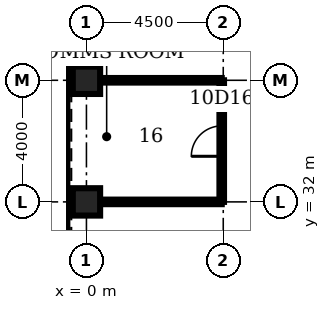
"""IFC4 building model, lengths in metres.
Left out: names, types, materials, properties, quantities, classifications, styles, units other than length and angle.
Written with IfcOpenShell. Run it as: python <this file> out.ifc"""

import sys

from ifc_helpers import new_model, si_unit, direction, frame, frame_2d, origin, origin_2d, place, context, subcontext, project, spatial, rectangle, hollow_rectangle, extrude, element, fill, save


model = new_model("IFC4")
c1 = context("Model", 3, precision=1e-05, world=origin(), true_north=direction((0.0, 1.0)))
c2 = subcontext(c1, "Body", "Model", "MODEL_VIEW")
j1 = project(units=[si_unit("LENGTHUNIT", "METRE"), si_unit("PLANEANGLEUNIT", "RADIAN")], contexts=[c1])
p1 = place(None, origin())
s1 = spatial("IfcSite", under=j1, at=p1, CompositionType="ELEMENT")
p2 = place(p1, origin())
s2 = spatial("IfcBuilding", under=s1, at=p2, CompositionType="ELEMENT")
p3 = place(p2, frame((0.0, 0.0, 50.0)))
s3 = spatial("IfcBuildingStorey", under=s2, at=p3, CompositionType="ELEMENT", Elevation=50.0)
for number, where, z_axis, x_axis in (
    (1, (0.0, 36.0, 0.0), (0.0, 0.0, 1.0), (1.0, 0.0, 0.0)),
    (2, (0.0, 32.0, 0.0), (0.0, 0.0, 1.0), (1.0, 0.0, 0.0)),
):
    element("IfcColumn", number, at=place(p3, frame(where, z_axis=z_axis, x_axis=x_axis)), inside=s3, PredefinedType="COLUMN", context=c2, shape_type="SweptSolid", body=[
        extrude(hollow_rectangle(XDim=0.9, YDim=0.9, WallThickness=0.12, at=origin_2d()), origin(), (0.0, 0.0, 1.0), 4.5),
    ])
for number, where, z_axis, x_axis in (
    (3, (0.45, 32.0, 0.0), (0.0, 0.0, 1.0), (1.0, 0.0, 0.0)),
    (4, (0.45, 36.0, 0.0), (0.0, 0.0, 1.0), (1.0, 0.0, 0.0)),
):
    element("IfcWall", number, at=place(p3, frame(where, z_axis=z_axis, x_axis=x_axis)), inside=s3, PredefinedType="PARTITIONING", context=c2, shape_type="SweptSolid", body=[
        extrude(rectangle(XDim=4.0, YDim=0.15, at=frame_2d((2.0, 0.0))), origin(), (0.0, 0.0, 1.0), 3.0),
    ])
p4 = place(p3, frame((4.45, 32.0, 0.0), z_axis=(0.0, 0.0, 1.0), x_axis=(0.0, 1.0, 0.0)))
e5 = element("IfcWall", 5, at=p4, inside=s3, PredefinedType="PARTITIONING", context=c2, shape_type="SweptSolid", body=[
    extrude(rectangle(XDim=4.0, YDim=0.15, at=frame_2d((2.0, 0.0))), origin(), (0.0, 0.0, 1.0), 3.0),
])
p5 = place(p4, frame((1.5, 0.0, 0.0)))
e6 = element("IfcOpeningElement", 6, at=p5, cuts=e5, PredefinedType="OPENING", context=c2, shape_type="SweptSolid", body=[
    extrude(rectangle(XDim=1.0, YDim=2.1, at=frame_2d((0.5, 1.05))), frame((0.0, 0.085, 0.0), z_axis=(0.0, -1.0, 0.0), x_axis=(1.0, 0.0, 0.0)), (0.0, 0.0, 1.0), 0.17),
])
p6 = place(p5, origin())
e7 = element("IfcDoor", 7, at=p6, inside=s3, OperationType="SINGLE_SWING_LEFT", PredefinedType="DOOR", context=c2, shape_type="SweptSolid", body=[
    extrude(rectangle(XDim=1.0, YDim=2.1, at=frame_2d((0.5, 1.05))), frame((0.0, 0.025, 0.0), z_axis=(0.0, -1.0, 0.0), x_axis=(1.0, 0.0, 0.0)), (0.0, 0.0, 1.0), 0.05),
])
fill(e6, e7)
save(model, sys.argv[1])
